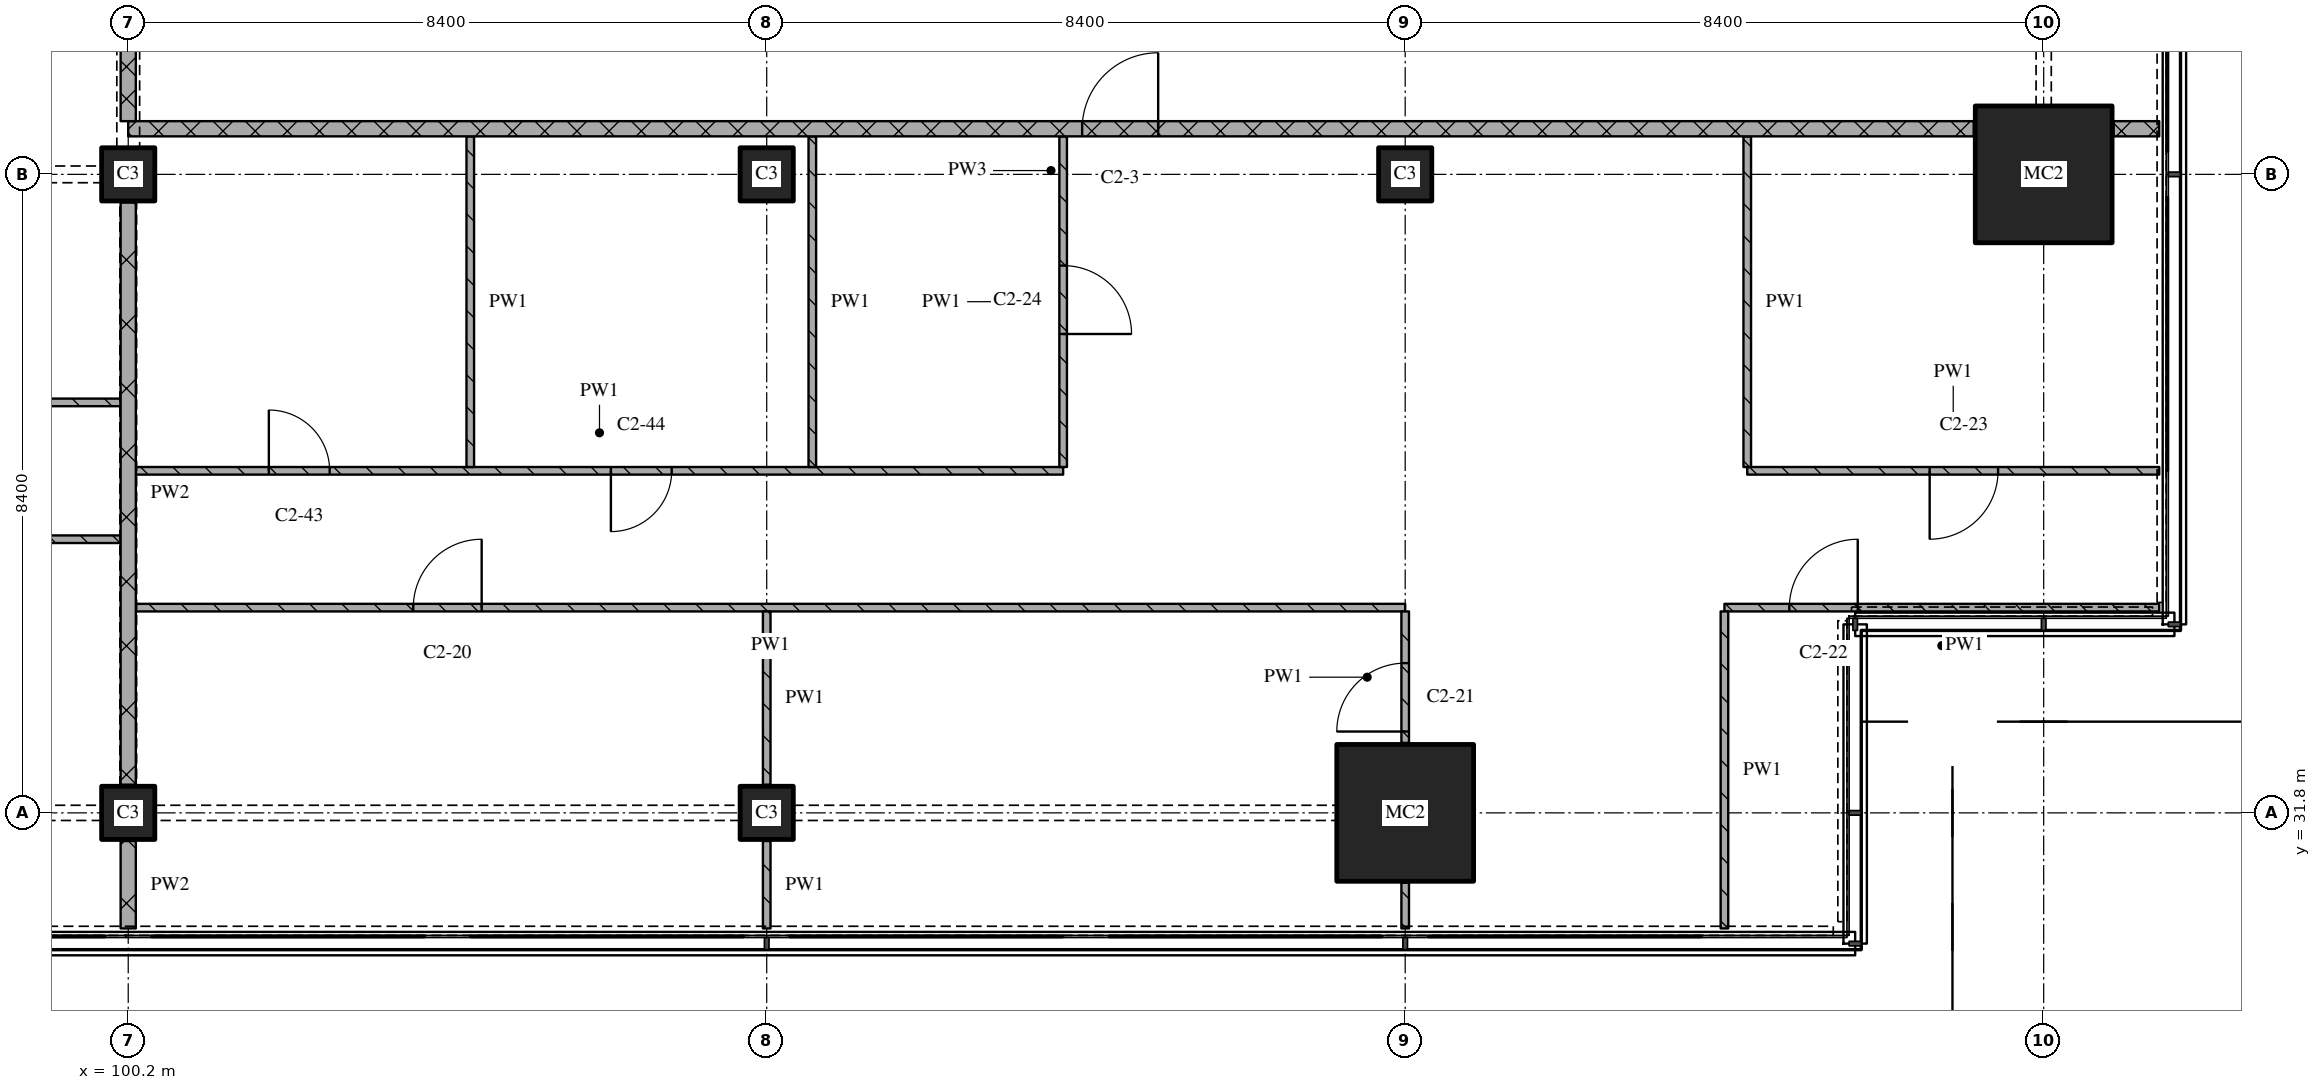
"""IFC4 building model, lengths in metres.
Left out: names, types, materials, properties, quantities, classifications, styles, units other than length and angle.
Written with IfcOpenShell. Run it as: python <this file> out.ifc"""

import sys

from ifc_helpers import new_model, si_unit, direction, frame, frame_2d, origin, origin_2d, place, context, subcontext, project, spatial, rectangle, extrude, element, fill, save


model = new_model("IFC4")
c1 = context("Model", 3, precision=1e-05, world=origin(), true_north=direction((0.0, 1.0)))
c2 = subcontext(c1, "Body", "Model", "MODEL_VIEW")
j1 = project(units=[si_unit("LENGTHUNIT", "METRE"), si_unit("PLANEANGLEUNIT", "RADIAN")], contexts=[c1])
p1 = place(None, origin())
s1 = spatial("IfcSite", under=j1, at=p1, CompositionType="ELEMENT")
p2 = place(p1, origin())
s2 = spatial("IfcBuilding", under=s1, at=p2, CompositionType="ELEMENT")
p3 = place(p2, frame((0.0, 0.0, 158.25)))
s3 = spatial("IfcBuildingStorey", under=s2, at=p3, CompositionType="ELEMENT", Elevation=158.25)
for number, where, z_axis, x_axis in (
    (1, (100.2, 31.8, 0.0), (0.0, 0.0, 1.0), (1.0, 0.0, 0.0)),
    (2, (100.2, 40.2, 0.0), (0.0, 0.0, 1.0), (1.0, 0.0, 0.0)),
    (3, (108.6, 31.8, 0.0), (0.0, 0.0, 1.0), (1.0, 0.0, 0.0)),
    (4, (108.6, 40.2, 0.0), (0.0, 0.0, 1.0), (1.0, 0.0, 0.0)),
):
    element("IfcColumn", number, at=place(p3, frame(where, z_axis=z_axis, x_axis=x_axis)), inside=s3, PredefinedType="COLUMN", context=c2, shape_type="SweptSolid", body=[
        extrude(rectangle(XDim=0.7, YDim=0.7, at=origin_2d()), origin(), (0.0, 0.0, 1.0), 3.6),
    ])
p4 = place(p3, frame((117.0, 31.8, 0.0), z_axis=(0.0, 0.0, 1.0), x_axis=(1.0, 0.0, 0.0)))
e5 = element("IfcColumn", 5, at=p4, inside=s3, PredefinedType="COLUMN", context=c2, shape_type="SweptSolid", body=[
    extrude(rectangle(XDim=1.8, YDim=1.8, at=origin_2d()), origin(), (0.0, 0.0, 1.0), 3.6),
])
p5 = place(p3, frame((117.0, 40.2, 0.0), z_axis=(0.0, 0.0, 1.0), x_axis=(1.0, 0.0, 0.0)))
e6 = element("IfcColumn", 6, at=p5, inside=s3, PredefinedType="COLUMN", context=c2, shape_type="SweptSolid", body=[
    extrude(rectangle(XDim=0.7, YDim=0.7, at=origin_2d()), origin(), (0.0, 0.0, 1.0), 3.6),
])
p6 = place(p3, frame((125.4, 40.2, 0.0), z_axis=(0.0, 0.0, 1.0), x_axis=(1.0, 0.0, 0.0)))
e7 = element("IfcColumn", 7, at=p6, inside=s3, PredefinedType="COLUMN", context=c2, shape_type="SweptSolid", body=[
    extrude(rectangle(XDim=1.8, YDim=1.8, at=origin_2d()), origin(), (0.0, 0.0, 1.0), 3.6),
])
p7 = place(p3, frame((117.0, 34.5, 0.0), z_axis=(0.0, 0.0, 1.0), x_axis=(-1.0, 0.0, 0.0)))
e8 = element("IfcWall", 8, at=p7, inside=s3, PredefinedType="PARTITIONING", context=c2, shape_type="SweptSolid", body=[
    extrude(rectangle(XDim=16.7, YDim=0.1, at=frame_2d((8.35, 0.0))), origin(), (0.0, 0.0, 1.0), 3.32),
])
p8 = place(p7, frame((12.15, 0.0, 0.0)))
e9 = element("IfcOpeningElement", 9, at=p8, cuts=e8, PredefinedType="OPENING", context=c2, shape_type="SweptSolid", body=[
    extrude(rectangle(XDim=0.9, YDim=2.1, at=frame_2d((0.45, 1.05))), frame((0.0, 0.06, 0.0), z_axis=(0.0, -1.0, 0.0), x_axis=(1.0, 0.0, 0.0)), (0.0, 0.0, 1.0), 0.12),
])
p9 = place(p3, frame((126.92, 34.5, 0.0), z_axis=(0.0, 0.0, 1.0), x_axis=(-1.0, 0.0, 0.0)))
e10 = element("IfcWall", 10, at=p9, inside=s3, PredefinedType="PARTITIONING", context=c2, shape_type="SweptSolid", body=[
    extrude(rectangle(XDim=5.72, YDim=0.1, at=frame_2d((2.86, 0.0))), origin(), (0.0, 0.0, 1.0), 3.32),
])
p10 = place(p9, frame((3.966, 0.0, 0.0)))
e11 = element("IfcOpeningElement", 11, at=p10, cuts=e10, PredefinedType="OPENING", context=c2, shape_type="SweptSolid", body=[
    extrude(rectangle(XDim=0.9, YDim=2.1, at=frame_2d((0.45, 1.05))), frame((0.0, 0.06, 0.0), z_axis=(0.0, -1.0, 0.0), x_axis=(1.0, 0.0, 0.0)), (0.0, 0.0, 1.0), 0.12),
])
p11 = place(p3, frame((100.1, 35.4, 0.0), z_axis=(0.0, 0.0, 1.0), x_axis=(-1.0, 0.0, 0.0)))
e12 = element("IfcWall", 12, at=p11, inside=s3, PredefinedType="PARTITIONING", context=c2, shape_type="SweptSolid", body=[
    extrude(rectangle(XDim=20.9, YDim=0.1, at=frame_2d((10.45, 0.0))), origin(), (0.0, 0.0, 1.0), 3.32),
])
p12 = place(p11, frame((1.55, 0.0, 0.0)))
e13 = element("IfcOpeningElement", 13, at=p12, cuts=e12, PredefinedType="OPENING", context=c2, shape_type="SweptSolid", body=[
    extrude(rectangle(XDim=0.9, YDim=2.1, at=frame_2d((0.45, 1.05))), frame((0.0, 0.06, 0.0), z_axis=(0.0, -1.0, 0.0), x_axis=(1.0, 0.0, 0.0)), (0.0, 0.0, 1.0), 0.12),
])
p13 = place(p11, frame((7.85, 0.0, 0.0)))
e14 = element("IfcOpeningElement", 14, at=p13, cuts=e12, PredefinedType="OPENING", context=c2, shape_type="SweptSolid", body=[
    extrude(rectangle(XDim=0.9, YDim=2.1, at=frame_2d((0.45, 1.05))), frame((0.0, 0.06, 0.0), z_axis=(0.0, -1.0, 0.0), x_axis=(1.0, 0.0, 0.0)), (0.0, 0.0, 1.0), 0.12),
])
p14 = place(p11, frame((16.25, 0.0, 0.0)))
e15 = element("IfcOpeningElement", 15, at=p14, cuts=e12, PredefinedType="OPENING", context=c2, shape_type="SweptSolid", body=[
    extrude(rectangle(XDim=0.9, YDim=2.1, at=frame_2d((0.45, 1.05))), frame((0.0, 0.06, 0.0), z_axis=(0.0, -1.0, 0.0), x_axis=(1.0, 0.0, 0.0)), (0.0, 0.0, 1.0), 0.12),
])
p15 = place(p3, frame((100.3, 36.3, 0.0), z_axis=(0.0, 0.0, 1.0), x_axis=(1.0, 0.0, 0.0)))
e16 = element("IfcWall", 16, at=p15, inside=s3, PredefinedType="PARTITIONING", context=c2, shape_type="SweptSolid", body=[
    extrude(rectangle(XDim=12.2, YDim=0.1, at=frame_2d((6.1, 0.0))), origin(), (0.0, 0.0, 1.0), 3.32),
])
p16 = place(p15, frame((1.75, 0.0, 0.0)))
e17 = element("IfcOpeningElement", 17, at=p16, cuts=e16, PredefinedType="OPENING", context=c2, shape_type="SweptSolid", body=[
    extrude(rectangle(XDim=0.8, YDim=2.1, at=frame_2d((0.4, 1.05))), frame((0.0, 0.06, 0.0), z_axis=(0.0, -1.0, 0.0), x_axis=(1.0, 0.0, 0.0)), (0.0, 0.0, 1.0), 0.12),
])
p17 = place(p15, frame((6.25, 0.0, 0.0)))
e18 = element("IfcOpeningElement", 18, at=p17, cuts=e16, PredefinedType="OPENING", context=c2, shape_type="SweptSolid", body=[
    extrude(rectangle(XDim=0.8, YDim=2.1, at=frame_2d((0.4, 1.05))), frame((0.0, 0.06, 0.0), z_axis=(0.0, -1.0, 0.0), x_axis=(1.0, 0.0, 0.0)), (0.0, 0.0, 1.0), 0.12),
])
p18 = place(p3, frame((121.5, 36.3, 0.0), z_axis=(0.0, 0.0, 1.0), x_axis=(1.0, 0.0, 0.0)))
e19 = element("IfcWall", 19, at=p18, inside=s3, PredefinedType="PARTITIONING", context=c2, shape_type="SweptSolid", body=[
    extrude(rectangle(XDim=5.42, YDim=0.1, at=frame_2d((2.71, 0.0))), origin(), (0.0, 0.0, 1.0), 3.32),
])
p19 = place(p18, frame((2.4, 0.0, 0.0)))
e20 = element("IfcOpeningElement", 20, at=p19, cuts=e19, PredefinedType="OPENING", context=c2, shape_type="SweptSolid", body=[
    extrude(rectangle(XDim=0.9, YDim=2.1, at=frame_2d((0.45, 1.05))), frame((0.0, 0.06, 0.0), z_axis=(0.0, -1.0, 0.0), x_axis=(1.0, 0.0, 0.0)), (0.0, 0.0, 1.0), 0.12),
])
p20 = place(p3, frame((94.733, 37.2, 0.0), z_axis=(0.0, 0.0, 1.0), x_axis=(1.0, 0.0, 0.0)))
e21 = element("IfcWall", 21, at=p20, inside=s3, PredefinedType="PARTITIONING", context=c2, shape_type="SweptSolid", body=[
    extrude(rectangle(XDim=5.367, YDim=0.1, at=frame_2d((2.683, 0.0))), origin(), (0.0, 0.0, 1.0), 3.32),
])
p21 = place(p20, frame((2.283, 0.0, 0.0)))
e22 = element("IfcOpeningElement", 22, at=p21, cuts=e21, PredefinedType="OPENING", context=c2, shape_type="SweptSolid", body=[
    extrude(rectangle(XDim=0.9, YDim=2.1, at=frame_2d((0.45, 1.05))), frame((0.0, 0.06, 0.0), z_axis=(0.0, -1.0, 0.0), x_axis=(1.0, 0.0, 0.0)), (0.0, 0.0, 1.0), 0.12),
])
p22 = place(p3, frame((124.48, 40.8, 0.0), z_axis=(0.0, 0.0, 1.0), x_axis=(-1.0, 0.0, 0.0)))
e23 = element("IfcWall", 23, at=p22, inside=s3, PredefinedType="PARTITIONING", context=c2, shape_type="SweptSolid", body=[
    extrude(rectangle(XDim=24.28, YDim=0.2, at=frame_2d((12.14, 0.0))), origin(), (0.0, 0.0, 1.0), 3.32),
])
p23 = place(p22, frame((10.73, 0.0, 0.0)))
e24 = element("IfcOpeningElement", 24, at=p23, cuts=e23, PredefinedType="OPENING", context=c2, shape_type="SweptSolid", body=[
    extrude(rectangle(XDim=1.0, YDim=2.1, at=frame_2d((0.5, 1.05))), frame((0.0, 0.11, 0.0), z_axis=(0.0, -1.0, 0.0), x_axis=(1.0, 0.0, 0.0)), (0.0, 0.0, 1.0), 0.22),
])
p24 = place(p3, frame((126.32, 40.8, 0.0), z_axis=(0.0, 0.0, 1.0), x_axis=(1.0, 0.0, 0.0)))
e25 = element("IfcWall", 25, at=p24, inside=s3, PredefinedType="PARTITIONING", context=c2, shape_type="SweptSolid", body=[
    extrude(rectangle(XDim=0.6, YDim=0.2, at=frame_2d((0.3, 0.0))), origin(), (0.0, 0.0, 1.0), 3.32),
])
p25 = place(p3, frame((100.2, 43.1, 0.0), z_axis=(0.0, 0.0, 1.0), x_axis=(0.0, -1.0, 0.0)))
e26 = element("IfcWall", 26, at=p25, inside=s3, PredefinedType="PARTITIONING", context=c2, shape_type="SweptSolid", body=[
    extrude(rectangle(XDim=2.2, YDim=0.2, at=frame_2d((1.1, 0.0))), origin(), (0.0, 0.0, 1.0), 2.43),
])
p26 = place(p3, frame((100.2, 31.43, 0.0), z_axis=(0.0, 0.0, 1.0), x_axis=(0.0, -1.0, 0.0)))
e27 = element("IfcWall", 27, at=p26, inside=s3, PredefinedType="PARTITIONING", context=c2, shape_type="SweptSolid", body=[
    extrude(rectangle(XDim=1.15, YDim=0.2, at=frame_2d((0.575, 0.0))), origin(), (0.0, 0.0, 1.0), 3.32),
])
p27 = place(p3, frame((100.2, 39.83, 0.0), z_axis=(0.0, 0.0, 1.0), x_axis=(0.0, -1.0, 0.0)))
e28 = element("IfcWall", 28, at=p27, inside=s3, PredefinedType="PARTITIONING", context=c2, shape_type="SweptSolid", body=[
    extrude(rectangle(XDim=7.66, YDim=0.2, at=frame_2d((3.83, 0.0))), origin(), (0.0, 0.0, 1.0), 2.72),
])
p28 = place(p3, frame((104.7, 40.7, 0.0), z_axis=(0.0, 0.0, 1.0), x_axis=(0.0, -1.0, 0.0)))
e29 = element("IfcWall", 29, at=p28, inside=s3, PredefinedType="PARTITIONING", context=c2, shape_type="SweptSolid", body=[
    extrude(rectangle(XDim=4.35, YDim=0.1, at=frame_2d((2.175, 0.0))), origin(), (0.0, 0.0, 1.0), 3.32),
])
p29 = place(p3, frame((108.6, 31.43, 0.0), z_axis=(0.0, 0.0, 1.0), x_axis=(0.0, -1.0, 0.0)))
e30 = element("IfcWall", 30, at=p29, inside=s3, PredefinedType="PARTITIONING", context=c2, shape_type="SweptSolid", body=[
    extrude(rectangle(XDim=1.15, YDim=0.1, at=frame_2d((0.575, 0.0))), origin(), (0.0, 0.0, 1.0), 3.32),
])
p30 = place(p3, frame((108.6, 34.45, 0.0), z_axis=(0.0, 0.0, 1.0), x_axis=(0.0, -1.0, 0.0)))
e31 = element("IfcWall", 31, at=p30, inside=s3, PredefinedType="PARTITIONING", context=c2, shape_type="SweptSolid", body=[
    extrude(rectangle(XDim=2.28, YDim=0.1, at=frame_2d((1.14, 0.0))), origin(), (0.0, 0.0, 1.0), 3.32),
])
p31 = place(p3, frame((109.2, 40.7, 0.0), z_axis=(0.0, 0.0, 1.0), x_axis=(0.0, -1.0, 0.0)))
e32 = element("IfcWall", 32, at=p31, inside=s3, PredefinedType="PARTITIONING", context=c2, shape_type="SweptSolid", body=[
    extrude(rectangle(XDim=4.35, YDim=0.1, at=frame_2d((2.175, 0.0))), origin(), (0.0, 0.0, 1.0), 3.32),
])
p32 = place(p3, frame((112.5, 36.35, 0.0), z_axis=(0.0, 0.0, 1.0), x_axis=(0.0, 1.0, 0.0)))
e33 = element("IfcWall", 33, at=p32, inside=s3, PredefinedType="PARTITIONING", context=c2, shape_type="SweptSolid", body=[
    extrude(rectangle(XDim=4.35, YDim=0.1, at=frame_2d((2.175, 0.0))), origin(), (0.0, 0.0, 1.0), 3.32),
])
p33 = place(p32, frame((1.75, 0.0, 0.0)))
e34 = element("IfcOpeningElement", 34, at=p33, cuts=e33, PredefinedType="OPENING", context=c2, shape_type="SweptSolid", body=[
    extrude(rectangle(XDim=0.9, YDim=2.1, at=frame_2d((0.45, 1.05))), frame((0.0, 0.06, 0.0), z_axis=(0.0, -1.0, 0.0), x_axis=(1.0, 0.0, 0.0)), (0.0, 0.0, 1.0), 0.12),
])
p34 = place(p3, frame((117.0, 30.88, 0.0), z_axis=(0.0, 0.0, 1.0), x_axis=(0.0, -1.0, 0.0)))
e35 = element("IfcWall", 35, at=p34, inside=s3, PredefinedType="PARTITIONING", context=c2, shape_type="SweptSolid", body=[
    extrude(rectangle(XDim=0.6, YDim=0.1, at=frame_2d((0.3, 0.0))), origin(), (0.0, 0.0, 1.0), 3.32),
])
p35 = place(p3, frame((117.0, 32.72, 0.0), z_axis=(0.0, 0.0, 1.0), x_axis=(0.0, 1.0, 0.0)))
e36 = element("IfcWall", 36, at=p35, inside=s3, PredefinedType="PARTITIONING", context=c2, shape_type="SweptSolid", body=[
    extrude(rectangle(XDim=1.73, YDim=0.1, at=frame_2d((0.865, 0.0))), origin(), (0.0, 0.0, 1.0), 3.32),
])
p36 = place(p35, frame((0.15, 0.0, 0.0)))
e37 = element("IfcOpeningElement", 37, at=p36, cuts=e36, PredefinedType="OPENING", context=c2, shape_type="SweptSolid", body=[
    extrude(rectangle(XDim=0.9, YDim=2.1, at=frame_2d((0.45, 1.05))), frame((0.0, 0.06, 0.0), z_axis=(0.0, -1.0, 0.0), x_axis=(1.0, 0.0, 0.0)), (0.0, 0.0, 1.0), 0.12),
])
p37 = place(p3, frame((121.2, 34.45, 0.0), z_axis=(0.0, 0.0, 1.0), x_axis=(0.0, -1.0, 0.0)))
e38 = element("IfcWall", 38, at=p37, inside=s3, PredefinedType="PARTITIONING", context=c2, shape_type="SweptSolid", body=[
    extrude(rectangle(XDim=4.17, YDim=0.1, at=frame_2d((2.085, 0.0))), origin(), (0.0, 0.0, 1.0), 3.32),
])
p38 = place(p3, frame((121.5, 40.7, 0.0), z_axis=(0.0, 0.0, 1.0), x_axis=(0.0, -1.0, 0.0)))
e39 = element("IfcWall", 39, at=p38, inside=s3, PredefinedType="PARTITIONING", context=c2, shape_type="SweptSolid", body=[
    extrude(rectangle(XDim=4.35, YDim=0.1, at=frame_2d((2.175, 0.0))), origin(), (0.0, 0.0, 1.0), 3.32),
])
p39 = place(p8, origin())
e40 = element("IfcDoor", 40, at=p39, inside=s3, OperationType="SINGLE_SWING_RIGHT", PredefinedType="DOOR", context=c2, shape_type="SweptSolid", body=[
    extrude(rectangle(XDim=0.9, YDim=2.1, at=frame_2d((0.45, 1.05))), frame((0.0, 0.025, 0.0), z_axis=(0.0, -1.0, 0.0), x_axis=(1.0, 0.0, 0.0)), (0.0, 0.0, 1.0), 0.05),
])
fill(e9, e40)
p40 = place(p10, origin())
e41 = element("IfcDoor", 41, at=p40, inside=s3, OperationType="SINGLE_SWING_RIGHT", PredefinedType="DOOR", context=c2, shape_type="SweptSolid", body=[
    extrude(rectangle(XDim=0.9, YDim=2.1, at=frame_2d((0.45, 1.05))), frame((0.0, 0.025, 0.0), z_axis=(0.0, -1.0, 0.0), x_axis=(1.0, 0.0, 0.0)), (0.0, 0.0, 1.0), 0.05),
])
fill(e11, e41)
p41 = place(p16, origin())
e42 = element("IfcDoor", 42, at=p41, inside=s3, OperationType="SINGLE_SWING_LEFT", PredefinedType="DOOR", context=c2, shape_type="SweptSolid", body=[
    extrude(rectangle(XDim=0.8, YDim=2.1, at=frame_2d((0.4, 1.05))), frame((0.0, 0.025, 0.0), z_axis=(0.0, -1.0, 0.0), x_axis=(1.0, 0.0, 0.0)), (0.0, 0.0, 1.0), 0.05),
])
fill(e17, e42)
p42 = place(p17, origin())
e43 = element("IfcDoor", 43, at=p42, inside=s3, OperationType="SINGLE_SWING_RIGHT", PredefinedType="DOOR", context=c2, shape_type="SweptSolid", body=[
    extrude(rectangle(XDim=0.8, YDim=2.1, at=frame_2d((0.4, 1.05))), frame((0.0, 0.025, 0.0), z_axis=(0.0, -1.0, 0.0), x_axis=(1.0, 0.0, 0.0)), (0.0, 0.0, 1.0), 0.05),
])
fill(e18, e43)
p43 = place(p19, origin())
e44 = element("IfcDoor", 44, at=p43, inside=s3, OperationType="SINGLE_SWING_RIGHT", PredefinedType="DOOR", context=c2, shape_type="SweptSolid", body=[
    extrude(rectangle(XDim=0.9, YDim=2.1, at=frame_2d((0.45, 1.05))), frame((0.0, 0.025, 0.0), z_axis=(0.0, -1.0, 0.0), x_axis=(1.0, 0.0, 0.0)), (0.0, 0.0, 1.0), 0.05),
])
fill(e20, e44)
p44 = place(p23, origin())
e45 = element("IfcDoor", 45, at=p44, inside=s3, OperationType="SINGLE_SWING_RIGHT", PredefinedType="DOOR", context=c2, shape_type="SweptSolid", body=[
    extrude(rectangle(XDim=1.0, YDim=2.1, at=frame_2d((0.5, 1.05))), frame((0.0, 0.025, 0.0), z_axis=(0.0, -1.0, 0.0), x_axis=(1.0, 0.0, 0.0)), (0.0, 0.0, 1.0), 0.05),
])
fill(e24, e45)
p45 = place(p33, origin())
e46 = element("IfcDoor", 46, at=p45, inside=s3, OperationType="SINGLE_SWING_RIGHT", PredefinedType="DOOR", context=c2, shape_type="SweptSolid", body=[
    extrude(rectangle(XDim=0.9, YDim=2.1, at=frame_2d((0.45, 1.05))), frame((0.0, 0.025, 0.0), z_axis=(0.0, -1.0, 0.0), x_axis=(1.0, 0.0, 0.0)), (0.0, 0.0, 1.0), 0.05),
])
fill(e34, e46)
p46 = place(p36, origin())
e47 = element("IfcDoor", 47, at=p46, inside=s3, OperationType="SINGLE_SWING_LEFT", PredefinedType="DOOR", context=c2, shape_type="SweptSolid", body=[
    extrude(rectangle(XDim=0.9, YDim=2.1, at=frame_2d((0.45, 1.05))), frame((0.0, 0.025, 0.0), z_axis=(0.0, -1.0, 0.0), x_axis=(1.0, 0.0, 0.0)), (0.0, 0.0, 1.0), 0.05),
])
fill(e37, e47)
save(model, sys.argv[1])
